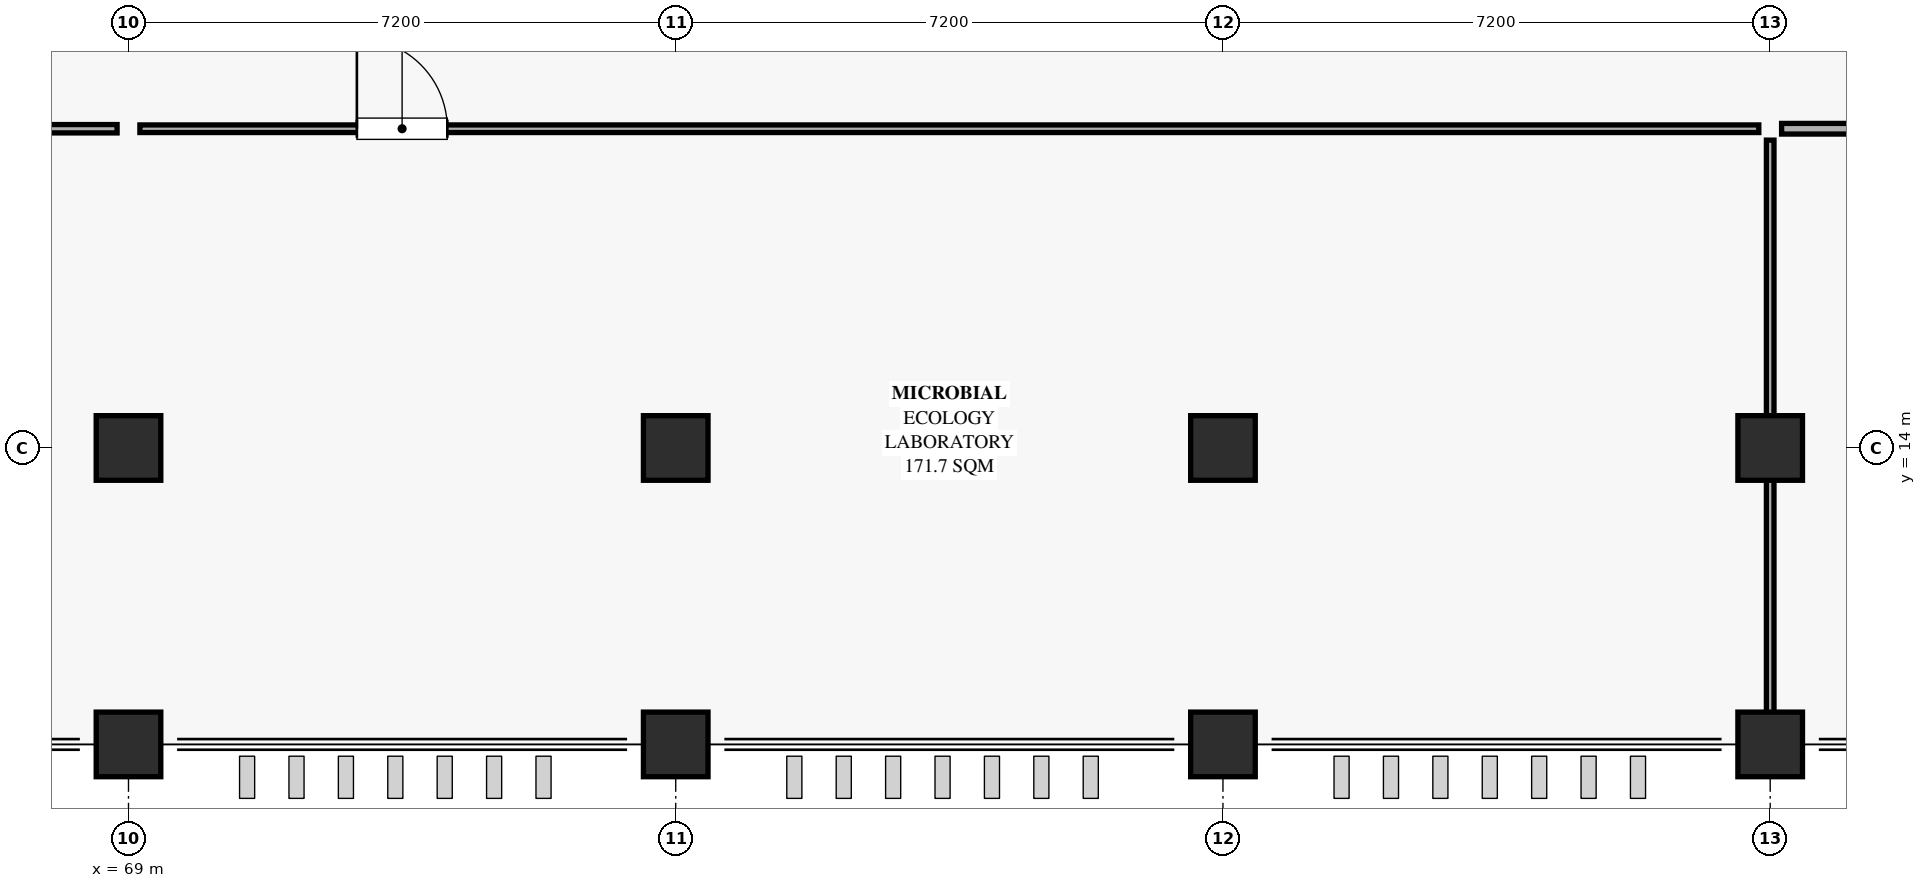
"""IFC4 building model, lengths in metres.
Left out: names, types, materials, properties, quantities, classifications, styles, units other than length and angle.
Written with IfcOpenShell. Run it as: python <this file> out.ifc"""

import sys

from ifc_helpers import new_model, si_unit, direction, frame, frame_2d, origin, origin_2d, place, context, subcontext, project, spatial, rectangle, extrude, element, fill, save


model = new_model("IFC4")
c1 = context("Model", 3, precision=1e-05, world=origin(), true_north=direction((0.0, 1.0)))
c2 = subcontext(c1, "Body", "Model", "MODEL_VIEW")
j1 = project(units=[si_unit("LENGTHUNIT", "METRE"), si_unit("PLANEANGLEUNIT", "RADIAN")], contexts=[c1])
p1 = place(None, origin())
s1 = spatial("IfcSite", under=j1, at=p1, CompositionType="ELEMENT")
p2 = place(p1, origin())
s2 = spatial("IfcBuilding", under=s1, at=p2, CompositionType="ELEMENT")
p3 = place(p2, frame((0.0, 0.0, 24.3)))
s3 = spatial("IfcBuildingStorey", under=s2, at=p3, CompositionType="ELEMENT", Elevation=24.3)
for number, where, z_axis, x_axis in (
    (1, (69.0, 10.1, 0.0), (0.0, 0.0, 1.0), (1.0, 0.0, 0.0)),
    (2, (76.2, 10.1, 0.0), (0.0, 0.0, 1.0), (1.0, 0.0, 0.0)),
    (3, (83.4, 10.1, 0.0), (0.0, 0.0, 1.0), (1.0, 0.0, 0.0)),
    (4, (90.6, 10.1, 0.0), (0.0, 0.0, 1.0), (1.0, 0.0, 0.0)),
    (5, (69.0, 14.0, 0.0), (0.0, 0.0, 1.0), (1.0, 0.0, 0.0)),
    (6, (76.2, 14.0, 0.0), (0.0, 0.0, 1.0), (1.0, 0.0, 0.0)),
    (7, (83.4, 14.0, 0.0), (0.0, 0.0, 1.0), (1.0, 0.0, 0.0)),
    (8, (90.6, 14.0, 0.0), (0.0, 0.0, 1.0), (1.0, 0.0, 0.0)),
):
    element("IfcColumn", number, at=place(p3, frame(where, z_axis=z_axis, x_axis=x_axis)), inside=s3, PredefinedType="COLUMN", context=c2, shape_type="SweptSolid", body=[
        extrude(rectangle(XDim=0.85, YDim=0.85, at=origin_2d()), origin(), (0.0, 0.0, 1.0), 4.5),
    ])
p4 = place(p3, frame((54.95, 18.2, 0.0), z_axis=(0.0, 0.0, 1.0), x_axis=(1.0, 0.0, 0.0)))
e9 = element("IfcWall", 9, at=p4, inside=s3, PredefinedType="PARTITIONING", context=c2, shape_type="SweptSolid", body=[
    extrude(rectangle(XDim=13.9, YDim=0.11, at=frame_2d((6.95, 0.0))), origin(), (0.0, 0.0, 1.0), 2.98),
])
p5 = place(p4, frame((2.655, 0.0, 0.0)))
e10 = element("IfcOpeningElement", 10, at=p5, cuts=e9, PredefinedType="OPENING", context=c2, shape_type="SweptSolid", body=[
    extrude(rectangle(XDim=1.19, YDim=2.1, at=frame_2d((0.595, 1.05))), frame((0.0, 0.065, 0.0), z_axis=(0.0, -1.0, 0.0), x_axis=(1.0, 0.0, 0.0)), (0.0, 0.0, 1.0), 0.13),
])
p6 = place(p3, frame((69.15, 18.2, 0.0), z_axis=(0.0, 0.0, 1.0), x_axis=(1.0, 0.0, 0.0)))
e11 = element("IfcWall", 11, at=p6, inside=s3, PredefinedType="PARTITIONING", context=c2, shape_type="SweptSolid", body=[
    extrude(rectangle(XDim=21.3, YDim=0.1, at=frame_2d((10.65, 0.0))), origin(), (0.0, 0.0, 1.0), 2.98),
])
p7 = place(p6, frame((2.855, 0.0, 0.0)))
e12 = element("IfcOpeningElement", 12, at=p7, cuts=e11, PredefinedType="OPENING", context=c2, shape_type="SweptSolid", body=[
    extrude(rectangle(XDim=1.19, YDim=2.16, at=frame_2d((0.595, 1.08))), frame((0.0, 0.06, 0.0), z_axis=(0.0, -1.0, 0.0), x_axis=(1.0, 0.0, 0.0)), (0.0, 0.0, 1.0), 0.12),
])
p8 = place(p3, frame((90.6, 18.05, 0.0), z_axis=(0.0, 0.0, 1.0), x_axis=(0.0, -1.0, 0.0)))
e13 = element("IfcWall", 13, at=p8, inside=s3, PredefinedType="PARTITIONING", context=c2, shape_type="SweptSolid", body=[
    extrude(rectangle(XDim=7.65, YDim=0.1, at=frame_2d((3.825, 0.0))), origin(), (0.0, 0.0, 1.0), 2.98),
])
p9 = place(p3, frame((90.75, 18.2, 0.0), z_axis=(0.0, 0.0, 1.0), x_axis=(1.0, 0.0, 0.0)))
e14 = element("IfcWall", 14, at=p9, inside=s3, PredefinedType="PARTITIONING", context=c2, shape_type="SweptSolid", body=[
    extrude(rectangle(XDim=28.3, YDim=0.14, at=frame_2d((14.15, 0.0))), origin(), (0.0, 0.0, 1.0), 2.98),
])
p10 = place(p9, frame((24.455, 0.0, 0.0)))
e15 = element("IfcOpeningElement", 15, at=p10, cuts=e14, PredefinedType="OPENING", context=c2, shape_type="SweptSolid", body=[
    extrude(rectangle(XDim=1.19, YDim=2.22, at=frame_2d((0.595, 1.11))), frame((0.0, 0.08, 0.0), z_axis=(0.0, -1.0, 0.0), x_axis=(1.0, 0.0, 0.0)), (0.0, 0.0, 1.0), 0.16),
])
p11 = place(p7, origin())
e16 = element("IfcDoor", 16, at=p11, inside=s3, OperationType="SINGLE_SWING_LEFT", PredefinedType="DOOR", context=c2, shape_type="SweptSolid", body=[
    extrude(rectangle(XDim=1.19, YDim=2.16, at=frame_2d((0.595, 1.08))), frame((0.0, 0.025, 0.0), z_axis=(0.0, -1.0, 0.0), x_axis=(1.0, 0.0, 0.0)), (0.0, 0.0, 1.0), 0.05),
])
fill(e12, e16)
save(model, sys.argv[1])
